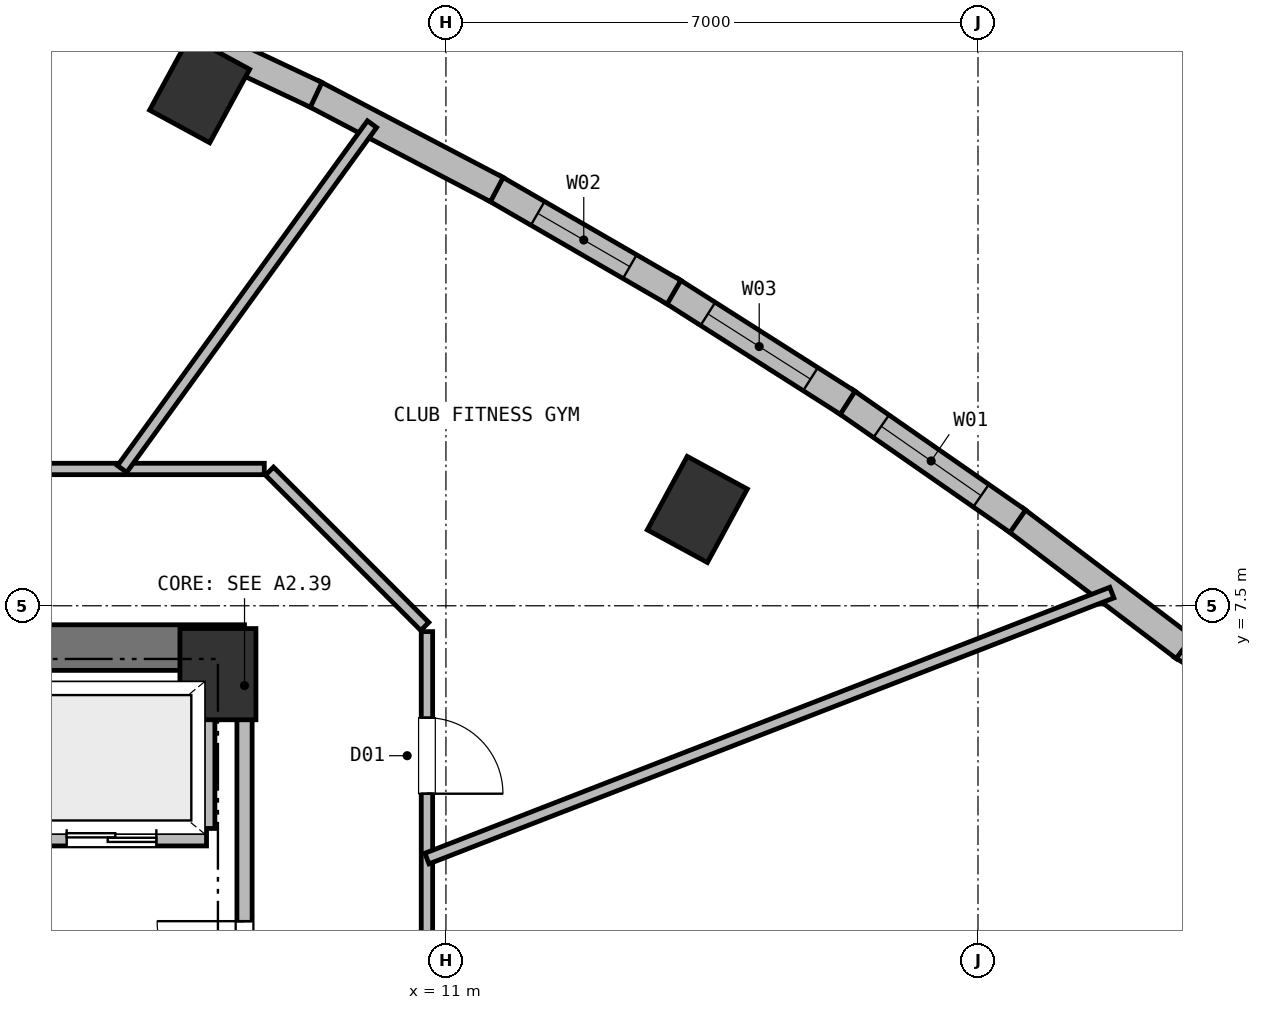
"""IFC4 building model, lengths in metres.
Left out: names, types, materials, properties, quantities, classifications, styles, units other than length and angle.
Written with IfcOpenShell. Run it as: python <this file> out.ifc"""

import sys

from ifc_helpers import new_model, si_unit, direction, frame, frame_2d, origin, origin_2d, place, context, subcontext, project, spatial, rectangle, extrude, element, fill, save


model = new_model("IFC4")
c1 = context("Model", 3, precision=1e-05, world=origin(), true_north=direction((0.0, 1.0)))
c2 = subcontext(c1, "Body", "Model", "MODEL_VIEW")
j1 = project(units=[si_unit("LENGTHUNIT", "METRE"), si_unit("PLANEANGLEUNIT", "RADIAN")], contexts=[c1])
p1 = place(None, origin())
s1 = spatial("IfcSite", under=j1, at=p1, CompositionType="ELEMENT")
p2 = place(p1, origin())
s2 = spatial("IfcBuilding", under=s1, at=p2, CompositionType="ELEMENT")
p3 = place(p2, frame((0.0, 0.0, 142.25)))
s3 = spatial("IfcBuildingStorey", under=s2, at=p3, CompositionType="ELEMENT", Elevation=142.25)
p4 = place(p3, frame((8.0, 6.6, 0.0), z_axis=(0.0, 0.0, 1.0), x_axis=(1.0, 0.0, 0.0)))
e1 = element("IfcColumn", 1, at=p4, inside=s3, PredefinedType="COLUMN", context=c2, shape_type="SweptSolid", body=[
    extrude(rectangle(XDim=1.0, YDim=1.2, at=origin_2d()), origin(), (0.0, 0.0, 1.0), 3.75),
])
p5 = place(p3, frame((-8.35, 6.95, 0.0), z_axis=(0.0, 0.0, 1.0), x_axis=(1.0, 0.0, 0.0)))
e2 = element("IfcWall", 2, at=p5, inside=s3, PredefinedType="SHEAR", context=c2, shape_type="SweptSolid", body=[
    extrude(rectangle(XDim=16.7, YDim=0.6, at=frame_2d((8.35, 0.0))), origin(), (0.0, 0.0, 1.0), 3.5),
])
for number, where, z_axis, x_axis in (
    (3, (14.307, 8.767, 0.0), (0.0, 0.0, 1.0), (-0.879, 0.477, 0.0)),
    (4, (7.759, 14.29, 0.0), (0.0, 0.0, 1.0), (-0.879, 0.477, 0.0)),
):
    element("IfcColumn", number, at=place(p3, frame(where, z_axis=z_axis, x_axis=x_axis)), inside=s3, PredefinedType="COLUMN", context=c2, shape_type="SweptSolid", body=[
        extrude(rectangle(XDim=0.9, YDim=1.1, at=origin_2d()), origin(), (0.0, 0.0, 1.0), 3.75),
    ])
p6 = place(p3, frame((20.674, 6.978, 0.0), z_axis=(0.0, 0.0, 1.0), x_axis=(0.852627228439, -0.522519673624, 0.0)))
e5 = element("IfcWall", 5, at=p6, inside=s3, PredefinedType="SOLIDWALL", context=c2, shape_type="SweptSolid", body=[
    extrude(rectangle(XDim=1.486, YDim=0.36, at=frame_2d((0.743, 0.0))), origin(), (0.0, 0.0, 1.0), 3.5),
])
p7 = place(p3, frame((18.483, 8.642, 0.0), z_axis=(0.0, 0.0, 1.0), x_axis=(0.796935762967, -0.604064060928, 0.0)))
e6 = element("IfcWall", 6, at=p7, inside=s3, PredefinedType="SOLIDWALL", context=c2, shape_type="SweptSolid", body=[
    extrude(rectangle(XDim=2.801, YDim=0.36, at=frame_2d((1.401, 0.0))), origin(), (0.0, 0.0, 1.0), 3.5),
])
p8 = place(p3, frame((16.244, 10.198, 0.0), z_axis=(0.0, 0.0, 1.0), x_axis=(0.820851453433, -0.5711417437, 0.0)))
e7 = element("IfcWall", 7, at=p8, inside=s3, PredefinedType="SOLIDWALL", context=c2, shape_type="SweptSolid", body=[
    extrude(rectangle(XDim=2.778, YDim=0.36, at=frame_2d((1.389, 0.0))), origin(), (0.0, 0.0, 1.0), 3.5),
])
p9 = place(p8, frame((0.589, 0.0, 0.72)))
e8 = element("IfcOpeningElement", 8, at=p9, cuts=e7, PredefinedType="OPENING", context=c2, shape_type="SweptSolid", body=[
    extrude(rectangle(XDim=1.6, YDim=1.88, at=frame_2d((0.8, 0.94))), frame((0.0, 0.19, 0.0), z_axis=(0.0, -1.0, 0.0), x_axis=(1.0, 0.0, 0.0)), (0.0, 0.0, 1.0), 0.38),
])
p10 = place(p3, frame((13.958, 11.651, 0.0), z_axis=(0.0, 0.0, 1.0), x_axis=(0.843759875161, -0.53672085209, 0.0)))
e9 = element("IfcWall", 9, at=p10, inside=s3, PredefinedType="SOLIDWALL", context=c2, shape_type="SweptSolid", body=[
    extrude(rectangle(XDim=2.758, YDim=0.36, at=frame_2d((1.379, 0.0))), origin(), (0.0, 0.0, 1.0), 3.5),
])
p11 = place(p10, frame((0.579, 0.0, 0.72)))
e10 = element("IfcOpeningElement", 10, at=p11, cuts=e9, PredefinedType="OPENING", context=c2, shape_type="SweptSolid", body=[
    extrude(rectangle(XDim=1.6, YDim=1.88, at=frame_2d((0.8, 0.94))), frame((0.0, 0.19, 0.0), z_axis=(0.0, -1.0, 0.0), x_axis=(1.0, 0.0, 0.0)), (0.0, 0.0, 1.0), 0.38),
])
p12 = place(p3, frame((11.626, 13.0, 0.0), z_axis=(0.0, 0.0, 1.0), x_axis=(0.86542019342, -0.501046793044, 0.0)))
e11 = element("IfcWall", 11, at=p12, inside=s3, PredefinedType="SOLIDWALL", context=c2, shape_type="SweptSolid", body=[
    extrude(rectangle(XDim=2.744, YDim=0.36, at=frame_2d((1.372, 0.0))), origin(), (0.0, 0.0, 1.0), 3.5),
])
p13 = place(p12, frame((0.672, 0.0, 0.72)))
e12 = element("IfcOpeningElement", 12, at=p13, cuts=e11, PredefinedType="OPENING", context=c2, shape_type="SweptSolid", body=[
    extrude(rectangle(XDim=1.4, YDim=1.84, at=frame_2d((0.7, 0.92))), frame((0.0, 0.19, 0.0), z_axis=(0.0, -1.0, 0.0), x_axis=(1.0, 0.0, 0.0)), (0.0, 0.0, 1.0), 0.38),
])
p14 = place(p3, frame((9.248, 14.245, 0.0), z_axis=(0.0, 0.0, 1.0), x_axis=(0.885821049336, -0.464027012741, 0.0)))
e13 = element("IfcWall", 13, at=p14, inside=s3, PredefinedType="SOLIDWALL", context=c2, shape_type="SweptSolid", body=[
    extrude(rectangle(XDim=2.734, YDim=0.36, at=frame_2d((1.367, 0.0))), origin(), (0.0, 0.0, 1.0), 3.5),
])
p15 = place(p3, frame((6.823, 15.386, 0.0), z_axis=(0.0, 0.0, 1.0), x_axis=(0.904715296729, -0.426016703739, 0.0)))
e14 = element("IfcWall", 14, at=p15, inside=s3, PredefinedType="SOLIDWALL", context=c2, shape_type="SweptSolid", body=[
    extrude(rectangle(XDim=2.729, YDim=0.36, at=frame_2d((1.365, 0.0))), origin(), (0.0, 0.0, 1.0), 3.5),
])
p16 = place(p3, frame((5.35, 4.45, 0.0), z_axis=(0.0, 0.0, 1.0), x_axis=(1.0, 0.0, 0.0)))
e15 = element("IfcWall", 15, at=p16, inside=s3, PredefinedType="PARTITIONING", context=c2, shape_type="SweptSolid", body=[
    extrude(rectangle(XDim=2.5, YDim=0.22, at=frame_2d((1.25, 0.0))), origin(), (0.0, 0.0, 1.0), 3.5),
])
p17 = place(p16, frame((0.66, 0.0, 0.0)))
e16 = element("IfcOpeningElement", 16, at=p17, cuts=e15, PredefinedType="OPENING", context=c2, shape_type="SweptSolid", body=[
    extrude(rectangle(XDim=1.18, YDim=2.15, at=frame_2d((0.59, 1.075))), frame((0.0, 0.12, 0.0), z_axis=(0.0, -1.0, 0.0), x_axis=(1.0, 0.0, 0.0)), (0.0, 0.0, 1.0), 0.24),
])
p18 = place(p3, frame((7.85, 4.57, 0.0), z_axis=(0.0, 0.0, 1.0), x_axis=(0.0, 1.0, 0.0)))
e17 = element("IfcWall", 17, at=p18, inside=s3, PredefinedType="PARTITIONING", context=c2, shape_type="SweptSolid", body=[
    extrude(rectangle(XDim=2.08, YDim=0.22, at=frame_2d((1.04, 0.0))), origin(), (0.0, 0.0, 1.0), 3.12),
])
p19 = place(p3, frame((8.35, 1.25, 0.0), z_axis=(0.0, 0.0, 1.0), x_axis=(0.0, 1.0, 0.0)))
e18 = element("IfcWall", 18, at=p19, inside=s3, PredefinedType="PARTITIONING", context=c2, shape_type="SweptSolid", body=[
    extrude(rectangle(XDim=5.3, YDim=0.2, at=frame_2d((2.65, 0.0))), origin(), (0.0, 0.0, 1.0), 3.5),
])
p20 = place(p19, frame((0.95, 0.0, 0.0)))
e19 = element("IfcOpeningElement", 19, at=p20, cuts=e18, PredefinedType="OPENING", context=c2, shape_type="SweptSolid", body=[
    extrude(rectangle(XDim=1.15, YDim=2.15, at=frame_2d((0.575, 1.075))), frame((0.0, 0.11, 0.0), z_axis=(0.0, -1.0, 0.0), x_axis=(1.0, 0.0, 0.0)), (0.0, 0.0, 1.0), 0.22),
])
p21 = place(p3, frame((10.75, 7.16, 0.0), z_axis=(0.0, 0.0, 1.0), x_axis=(0.0, -1.0, 0.0)))
e20 = element("IfcWall", 20, at=p21, inside=s3, PredefinedType="PARTITIONING", context=c2, shape_type="SweptSolid", body=[
    extrude(rectangle(XDim=12.92, YDim=0.15, at=frame_2d((6.46, 0.0))), origin(), (0.0, 0.0, 1.0), 3.5),
])
p22 = place(p21, frame((1.133, 0.0, 0.0)))
e21 = element("IfcOpeningElement", 21, at=p22, cuts=e20, PredefinedType="OPENING", context=c2, shape_type="SweptSolid", body=[
    extrude(rectangle(XDim=1.0, YDim=2.15, at=frame_2d((0.5, 1.075))), frame((0.0, 0.085, 0.0), z_axis=(0.0, -1.0, 0.0), x_axis=(1.0, 0.0, 0.0)), (0.0, 0.0, 1.0), 0.17),
])
p23 = place(p21, frame((4.989, 0.0, 0.0)))
e22 = element("IfcOpeningElement", 22, at=p23, cuts=e20, PredefinedType="OPENING", context=c2, shape_type="SweptSolid", body=[
    extrude(rectangle(XDim=1.06, YDim=2.15, at=frame_2d((0.53, 1.075))), frame((0.0, 0.085, 0.0), z_axis=(0.0, -1.0, 0.0), x_axis=(1.0, 0.0, 0.0)), (0.0, 0.0, 1.0), 0.17),
])
p24 = place(p3, frame((8.678, 9.272, 0.0), z_axis=(0.0, 0.0, 1.0), x_axis=(0.707106781187, -0.707106781187, 0.0)))
e23 = element("IfcWall", 23, at=p24, inside=s3, PredefinedType="PARTITIONING", context=c2, shape_type="SweptSolid", body=[
    extrude(rectangle(XDim=2.89, YDim=0.15, at=frame_2d((1.445, 0.0))), origin(), (0.0, 0.0, 1.0), 3.5),
])
p25 = place(p3, frame((-8.61, 9.3, 0.0), z_axis=(0.0, 0.0, 1.0), x_axis=(1.0, 0.0, 0.0)))
e24 = element("IfcWall", 24, at=p25, inside=s3, PredefinedType="PARTITIONING", context=c2, shape_type="SweptSolid", body=[
    extrude(rectangle(XDim=17.22, YDim=0.15, at=frame_2d((8.61, 0.0))), origin(), (0.0, 0.0, 1.0), 3.5),
])
p26 = place(p25, frame((11.966, 0.0, 0.0)))
e25 = element("IfcOpeningElement", 25, at=p26, cuts=e24, PredefinedType="OPENING", context=c2, shape_type="SweptSolid", body=[
    extrude(rectangle(XDim=1.0, YDim=2.15, at=frame_2d((0.5, 1.075))), frame((0.0, 0.085, 0.0), z_axis=(0.0, -1.0, 0.0), x_axis=(1.0, 0.0, 0.0)), (0.0, 0.0, 1.0), 0.17),
])
p27 = place(p25, frame((1.059, 0.0, 0.0)))
e26 = element("IfcOpeningElement", 26, at=p27, cuts=e24, PredefinedType="OPENING", context=c2, shape_type="SweptSolid", body=[
    extrude(rectangle(XDim=1.0, YDim=2.15, at=frame_2d((0.5, 1.075))), frame((0.0, 0.085, 0.0), z_axis=(0.0, -1.0, 0.0), x_axis=(1.0, 0.0, 0.0)), (0.0, 0.0, 1.0), 0.17),
])
p28 = place(p25, frame((4.252, 0.0, 0.0)))
e27 = element("IfcOpeningElement", 27, at=p28, cuts=e24, PredefinedType="OPENING", context=c2, shape_type="SweptSolid", body=[
    extrude(rectangle(XDim=1.06, YDim=2.15, at=frame_2d((0.53, 1.075))), frame((0.0, 0.085, 0.0), z_axis=(0.0, -1.0, 0.0), x_axis=(1.0, 0.0, 0.0)), (0.0, 0.0, 1.0), 0.17),
])
p29 = place(p3, frame((10.75, 4.174, 0.0), z_axis=(0.0, 0.0, 1.0), x_axis=(0.932193195681, 0.361961111068, 0.0)))
e28 = element("IfcWall", 28, at=p29, inside=s3, PredefinedType="PARTITIONING", context=c2, shape_type="SweptSolid", body=[
    extrude(rectangle(XDim=9.666, YDim=0.15, at=frame_2d((4.833, 0.0))), origin(), (0.0, 0.0, 1.0), 3.5),
])
p30 = place(p3, frame((6.739, 9.3, 0.0), z_axis=(0.0, 0.0, 1.0), x_axis=(0.586776904719, 0.809748642536, 0.0)))
e29 = element("IfcWall", 29, at=p30, inside=s3, PredefinedType="PARTITIONING", context=c2, shape_type="SweptSolid", body=[
    extrude(rectangle(XDim=5.603, YDim=0.15, at=frame_2d((2.801, 0.0))), origin(), (0.0, 0.0, 1.0), 3.5),
])
p31 = place(p9, origin())
e30 = element("IfcWindow", 30, at=p31, inside=s3, PartitioningType="SINGLE_PANEL", PredefinedType="WINDOW", context=c2, shape_type="SweptSolid", body=[
    extrude(rectangle(XDim=1.6, YDim=1.88, at=frame_2d((0.8, 0.94))), frame((0.0, 0.03, 0.0), z_axis=(0.0, -1.0, 0.0), x_axis=(1.0, 0.0, 0.0)), (0.0, 0.0, 1.0), 0.06),
])
fill(e8, e30)
p32 = place(p11, origin())
e31 = element("IfcWindow", 31, at=p32, inside=s3, PartitioningType="SINGLE_PANEL", PredefinedType="WINDOW", context=c2, shape_type="SweptSolid", body=[
    extrude(rectangle(XDim=1.6, YDim=1.88, at=frame_2d((0.8, 0.94))), frame((0.0, 0.03, 0.0), z_axis=(0.0, -1.0, 0.0), x_axis=(1.0, 0.0, 0.0)), (0.0, 0.0, 1.0), 0.06),
])
fill(e10, e31)
p33 = place(p13, origin())
e32 = element("IfcWindow", 32, at=p33, inside=s3, PartitioningType="SINGLE_PANEL", PredefinedType="WINDOW", context=c2, shape_type="SweptSolid", body=[
    extrude(rectangle(XDim=1.4, YDim=1.84, at=frame_2d((0.7, 0.92))), frame((0.0, 0.03, 0.0), z_axis=(0.0, -1.0, 0.0), x_axis=(1.0, 0.0, 0.0)), (0.0, 0.0, 1.0), 0.06),
])
fill(e12, e32)
p34 = place(p17, origin())
e33 = element("IfcDoor", 33, at=p34, inside=s3, OperationType="DOUBLE_DOOR_SLIDING", PredefinedType="DOOR", context=c2, shape_type="SweptSolid", body=[
    extrude(rectangle(XDim=1.18, YDim=2.15, at=frame_2d((0.59, 1.075))), frame((0.0, 0.025, 0.0), z_axis=(0.0, -1.0, 0.0), x_axis=(1.0, 0.0, 0.0)), (0.0, 0.0, 1.0), 0.05),
])
fill(e16, e33)
p35 = place(p20, origin())
e34 = element("IfcDoor", 34, at=p35, inside=s3, OperationType="SINGLE_SWING_RIGHT", PredefinedType="DOOR", context=c2, shape_type="SweptSolid", body=[
    extrude(rectangle(XDim=1.15, YDim=2.15, at=frame_2d((0.575, 1.075))), frame((0.0, 0.025, 0.0), z_axis=(0.0, -1.0, 0.0), x_axis=(1.0, 0.0, 0.0)), (0.0, 0.0, 1.0), 0.05),
])
fill(e19, e34)
p36 = place(p22, origin())
e35 = element("IfcDoor", 35, at=p36, inside=s3, OperationType="SINGLE_SWING_RIGHT", PredefinedType="DOOR", context=c2, shape_type="SweptSolid", body=[
    extrude(rectangle(XDim=1.0, YDim=2.15, at=frame_2d((0.5, 1.075))), frame((0.0, 0.025, 0.0), z_axis=(0.0, -1.0, 0.0), x_axis=(1.0, 0.0, 0.0)), (0.0, 0.0, 1.0), 0.05),
])
fill(e21, e35)
save(model, sys.argv[1])
